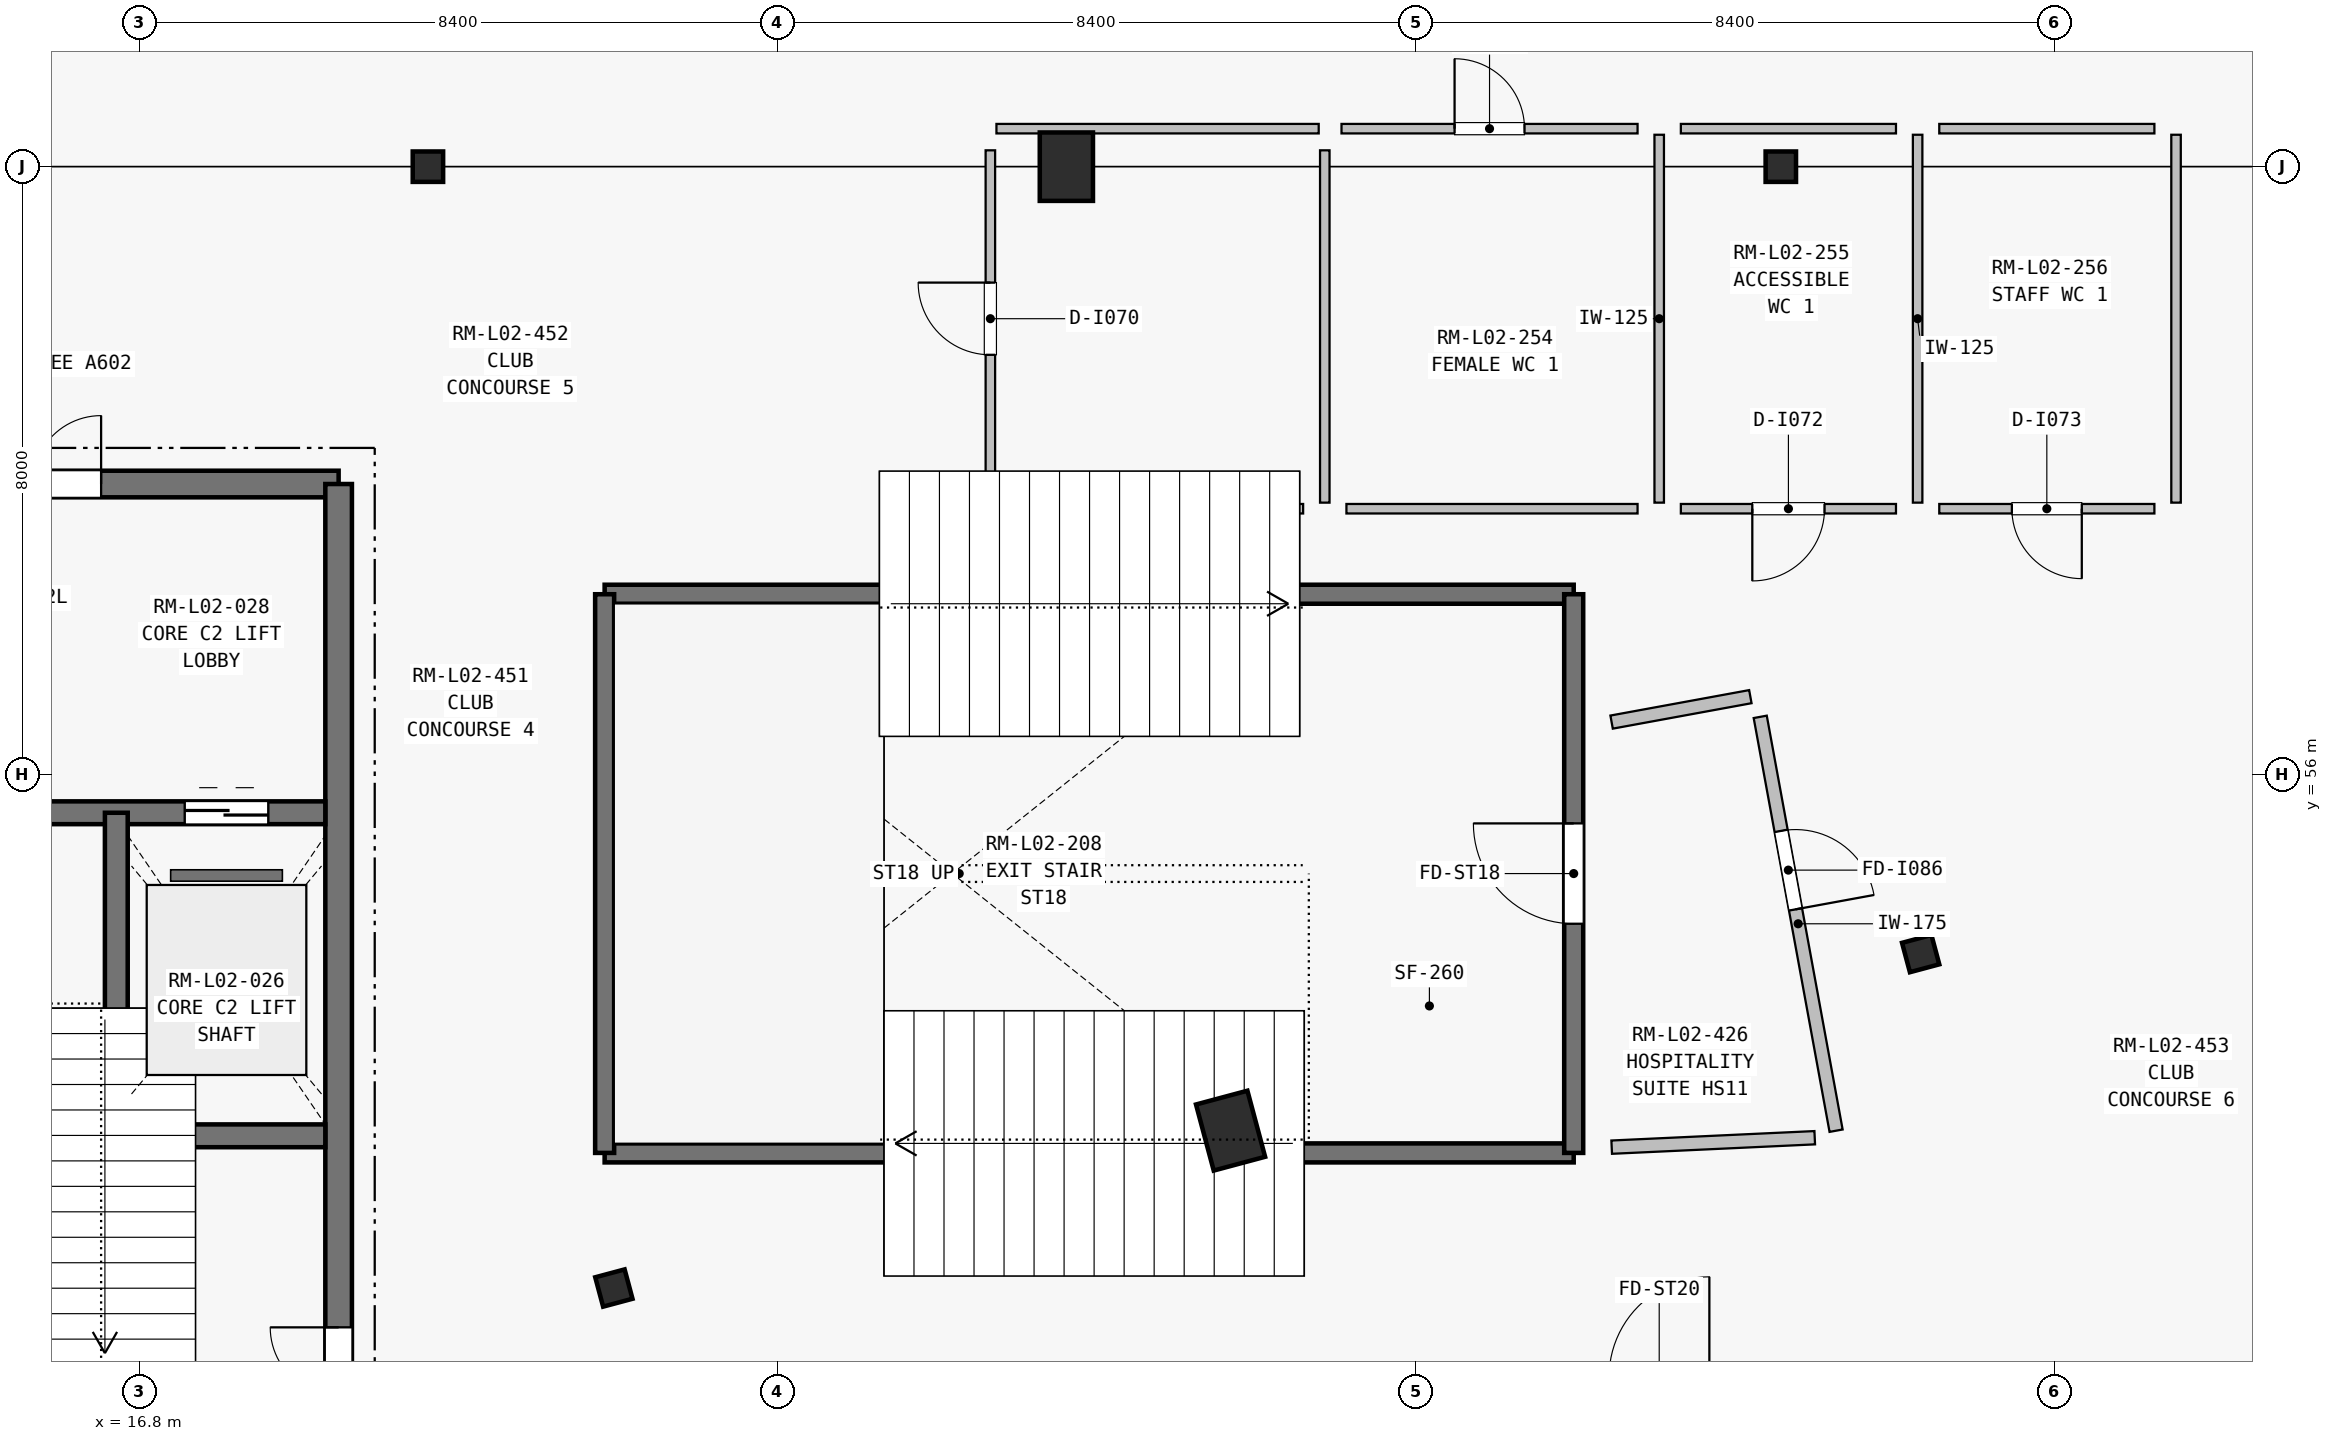
"""IFC4 building model, lengths in metres.
Left out: names, types, materials, properties, quantities, classifications, styles, units other than length and angle.
Written with IfcOpenShell. Run it as: python <this file> out.ifc"""

import sys

from ifc_helpers import new_model, si_unit, direction, frame, frame_2d, origin, origin_2d, place, context, subcontext, project, spatial, rectangle, i_section, extrude, element, fill, save


model = new_model("IFC4")
c1 = context("Model", 3, precision=1e-05, world=origin(), true_north=direction((0.0, 1.0)))
c2 = subcontext(c1, "Body", "Model", "MODEL_VIEW")
j1 = project(units=[si_unit("LENGTHUNIT", "METRE"), si_unit("PLANEANGLEUNIT", "RADIAN")], contexts=[c1])
p1 = place(None, origin())
s1 = spatial("IfcSite", under=j1, at=p1, CompositionType="ELEMENT")
p2 = place(p1, origin())
s2 = spatial("IfcBuilding", under=s1, at=p2, CompositionType="ELEMENT")
p3 = place(p2, frame((0.0, 0.0, 9.9)))
s3 = spatial("IfcBuildingStorey", under=s2, at=p3, CompositionType="ELEMENT", Elevation=9.9)
for number, where, z_axis, x_axis in (
    (1, (38.4, 64.0, 0.0), (0.0, 0.0, 1.0), (-1.0, 0.0, 0.0)),
    (2, (40.24, 53.647, 0.0), (0.0, 0.0, 1.0), (-0.966, -0.259, 0.0)),
):
    element("IfcColumn", number, at=place(p3, frame(where, z_axis=z_axis, x_axis=x_axis)), inside=s3, PredefinedType="COLUMN", context=c2, shape_type="SweptSolid", body=[
        extrude(i_section(OverallWidth=0.4, OverallDepth=0.4, WebThickness=0.018, FlangeThickness=0.032, at=origin_2d()), origin(), (0.0, 0.0, 1.0), 4.5),
    ])
for number, where, z_axis, x_axis in (
    (3, (29.0, 64.0, 0.0), (0.0, 0.0, 1.0), (-1.0, 0.0, 0.0)),
    (4, (31.16, 51.318, 0.0), (0.0, 0.0, 1.0), (-0.966, -0.259, 0.0)),
):
    element("IfcColumn", number, at=place(p3, frame(where, z_axis=z_axis, x_axis=x_axis)), inside=s3, PredefinedType="COLUMN", context=c2, shape_type="SweptSolid", body=[
        extrude(rectangle(XDim=0.7, YDim=0.9, at=origin_2d()), origin(), (0.0, 0.0, 1.0), 4.5),
    ])
for number, where, z_axis, x_axis in (
    (5, (20.6, 64.0, 0.0), (0.0, 0.0, 1.0), (-1.0, 0.0, 0.0)),
    (6, (23.046, 49.247, 0.0), (0.0, 0.0, 1.0), (-0.966, -0.259, 0.0)),
):
    element("IfcColumn", number, at=place(p3, frame(where, z_axis=z_axis, x_axis=x_axis)), inside=s3, PredefinedType="COLUMN", context=c2, shape_type="SweptSolid", body=[
        extrude(i_section(OverallWidth=0.4, OverallDepth=0.4, WebThickness=0.016, FlangeThickness=0.028, at=origin_2d()), origin(), (0.0, 0.0, 1.0), 4.5),
    ])
p4 = place(p3, frame((11.375, 59.825, 0.0), z_axis=(0.0, 0.0, 1.0), x_axis=(1.0, 0.0, 0.0)))
e7 = element("IfcWall", 7, at=p4, inside=s3, PredefinedType="SHEAR", context=c2, shape_type="SweptSolid", body=[
    extrude(rectangle(XDim=8.05, YDim=0.35, at=frame_2d((4.025, 0.0))), origin(), (0.0, 0.0, 1.0), 4.5),
])
p5 = place(p4, frame((3.125, 0.0, 0.0)))
e8 = element("IfcOpeningElement", 8, at=p5, cuts=e7, PredefinedType="OPENING", context=c2, shape_type="SweptSolid", body=[
    extrude(rectangle(XDim=1.8, YDim=2.25, at=frame_2d((0.9, 1.125))), frame((0.0, 0.185, 0.0), z_axis=(0.0, -1.0, 0.0), x_axis=(1.0, 0.0, 0.0)), (0.0, 0.0, 1.0), 0.37),
])
p6 = place(p3, frame((19.425, 44.975, 0.0), z_axis=(0.0, 0.0, 1.0), x_axis=(0.0, 1.0, 0.0)))
e9 = element("IfcWall", 9, at=p6, inside=s3, PredefinedType="SHEAR", context=c2, shape_type="SweptSolid", body=[
    extrude(rectangle(XDim=14.85, YDim=0.35, at=frame_2d((7.425, 0.0))), origin(), (0.0, 0.0, 1.0), 4.5),
])
p7 = place(p6, frame((2.855, 0.0, 0.0)))
e10 = element("IfcOpeningElement", 10, at=p7, cuts=e9, PredefinedType="OPENING", context=c2, shape_type="SweptSolid", body=[
    extrude(rectangle(XDim=0.9, YDim=2.1, at=frame_2d((0.45, 1.05))), frame((0.0, 0.185, 0.0), z_axis=(0.0, -1.0, 0.0), x_axis=(1.0, 0.0, 0.0)), (0.0, 0.0, 1.0), 0.37),
])
p8 = place(p3, frame((11.55, 55.5, 0.0), z_axis=(0.0, 0.0, 1.0), x_axis=(1.0, 0.0, 0.0)))
e11 = element("IfcWall", 11, at=p8, inside=s3, PredefinedType="SHEAR", context=c2, shape_type="SweptSolid", body=[
    extrude(rectangle(XDim=7.7, YDim=0.3, at=frame_2d((3.85, 0.0))), origin(), (0.0, 0.0, 1.0), 4.5),
])
p9 = place(p8, frame((1.65, 0.0, 0.0)))
e12 = element("IfcOpeningElement", 12, at=p9, cuts=e11, PredefinedType="OPENING", context=c2, shape_type="SweptSolid", body=[
    extrude(rectangle(XDim=1.4, YDim=2.2, at=frame_2d((0.7, 1.1))), frame((0.0, 0.16, 0.0), z_axis=(0.0, -1.0, 0.0), x_axis=(1.0, 0.0, 0.0)), (0.0, 0.0, 1.0), 0.32),
])
p10 = place(p8, frame((5.85, 0.0, 0.0)))
e13 = element("IfcOpeningElement", 13, at=p10, cuts=e11, PredefinedType="OPENING", context=c2, shape_type="SweptSolid", body=[
    extrude(rectangle(XDim=1.1, YDim=2.2, at=frame_2d((0.55, 1.1))), frame((0.0, 0.16, 0.0), z_axis=(0.0, -1.0, 0.0), x_axis=(1.0, 0.0, 0.0)), (0.0, 0.0, 1.0), 0.32),
])
p11 = place(p3, frame((16.5, 45.15, 0.0), z_axis=(0.0, 0.0, 1.0), x_axis=(0.0, 1.0, 0.0)))
e14 = element("IfcWall", 14, at=p11, inside=s3, PredefinedType="SHEAR", context=c2, shape_type="SweptSolid", body=[
    extrude(rectangle(XDim=10.35, YDim=0.3, at=frame_2d((5.175, 0.0))), origin(), (0.0, 0.0, 1.0), 4.5),
])
p12 = place(p3, frame((16.65, 51.25, 0.0), z_axis=(0.0, 0.0, 1.0), x_axis=(1.0, 0.0, 0.0)))
e15 = element("IfcWall", 15, at=p12, inside=s3, PredefinedType="SHEAR", context=c2, shape_type="SweptSolid", body=[
    extrude(rectangle(XDim=2.6, YDim=0.3, at=frame_2d((1.3, 0.0))), origin(), (0.0, 0.0, 1.0), 4.5),
])
for number, where, z_axis, x_axis in (
    (16, (22.925, 51.025, 0.0), (0.0, 0.0, 1.0), (1.0, 0.0, 0.0)),
    (17, (22.925, 58.375, 0.0), (0.0, 0.0, 1.0), (1.0, 0.0, 0.0)),
):
    element("IfcWall", number, at=place(p3, frame(where, z_axis=z_axis, x_axis=x_axis)), inside=s3, PredefinedType="SHEAR", context=c2, shape_type="SweptSolid", body=[
        extrude(rectangle(XDim=12.75, YDim=0.25, at=frame_2d((6.375, 0.0))), origin(), (0.0, 0.0, 1.0), 4.5),
    ])
p13 = place(p3, frame((22.925, 51.025, 0.0), z_axis=(0.0, 0.0, 1.0), x_axis=(0.0, 1.0, 0.0)))
e18 = element("IfcWall", 18, at=p13, inside=s3, PredefinedType="SHEAR", context=c2, shape_type="SweptSolid", body=[
    extrude(rectangle(XDim=7.35, YDim=0.25, at=frame_2d((3.675, 0.0))), origin(), (0.0, 0.0, 1.0), 4.5),
])
p14 = place(p3, frame((35.675, 51.025, 0.0), z_axis=(0.0, 0.0, 1.0), x_axis=(0.0, 1.0, 0.0)))
e19 = element("IfcWall", 19, at=p14, inside=s3, PredefinedType="SHEAR", context=c2, shape_type="SweptSolid", body=[
    extrude(rectangle(XDim=7.35, YDim=0.25, at=frame_2d((3.675, 0.0))), origin(), (0.0, 0.0, 1.0), 4.5),
])
p15 = place(p14, frame((3.015, 0.0, 0.0)))
e20 = element("IfcOpeningElement", 20, at=p15, cuts=e19, PredefinedType="OPENING", context=c2, shape_type="SweptSolid", body=[
    extrude(rectangle(XDim=1.32, YDim=2.2, at=frame_2d((0.66, 1.1))), frame((0.0, 0.135, 0.0), z_axis=(0.0, -1.0, 0.0), x_axis=(1.0, 0.0, 0.0)), (0.0, 0.0, 1.0), 0.27),
])
p16 = place(p3, frame((28.08, 64.5, 0.0), z_axis=(0.0, 0.0, 1.0), x_axis=(1.0, 0.0, 0.0)))
e21 = element("IfcWall", 21, at=p16, inside=s3, PredefinedType="PARTITIONING", context=c2, shape_type="SweptSolid", body=[
    extrude(rectangle(XDim=4.24, YDim=0.125, at=frame_2d((2.12, 0.0))), origin(), (0.0, 0.0, 1.0), 4.19),
])
p17 = place(p3, frame((32.4, 64.215, 0.0), z_axis=(0.0, 0.0, 1.0), x_axis=(0.0, -1.0, 0.0)))
e22 = element("IfcWall", 22, at=p17, inside=s3, PredefinedType="PARTITIONING", context=c2, shape_type="SweptSolid", body=[
    extrude(rectangle(XDim=4.635, YDim=0.125, at=frame_2d((2.317, 0.0))), origin(), (0.0, 0.0, 1.0), 3.637),
])
p18 = place(p3, frame((32.115, 59.5, 0.0), z_axis=(0.0, 0.0, 1.0), x_axis=(-1.0, 0.0, 0.0)))
e23 = element("IfcWall", 23, at=p18, inside=s3, PredefinedType="PARTITIONING", context=c2, shape_type="SweptSolid", body=[
    extrude(rectangle(XDim=4.035, YDim=0.125, at=frame_2d((2.018, 0.0))), origin(), (0.0, 0.0, 1.0), 4.22),
])
p19 = place(p3, frame((28.0, 59.785, 0.0), z_axis=(0.0, 0.0, 1.0), x_axis=(0.0, 1.0, 0.0)))
e24 = element("IfcWall", 24, at=p19, inside=s3, PredefinedType="PARTITIONING", context=c2, shape_type="SweptSolid", body=[
    extrude(rectangle(XDim=4.43, YDim=0.125, at=frame_2d((2.215, 0.0))), origin(), (0.0, 0.0, 1.0), 3.637),
])
p20 = place(p19, frame((1.74, 0.0, 0.0)))
e25 = element("IfcOpeningElement", 25, at=p20, cuts=e24, PredefinedType="OPENING", context=c2, shape_type="SweptSolid", body=[
    extrude(rectangle(XDim=0.95, YDim=2.1, at=frame_2d((0.475, 1.05))), frame((0.0, 0.073, 0.0), z_axis=(0.0, -1.0, 0.0), x_axis=(1.0, 0.0, 0.0)), (0.0, 0.0, 1.0), 0.145),
])
p21 = place(p3, frame((36.8, 64.42, 0.0), z_axis=(0.0, 0.0, 1.0), x_axis=(0.0, -1.0, 0.0)))
e26 = element("IfcWall", 26, at=p21, inside=s3, PredefinedType="PARTITIONING", context=c2, shape_type="SweptSolid", body=[
    extrude(rectangle(XDim=4.84, YDim=0.125, at=frame_2d((2.42, 0.0))), origin(), (0.0, 0.0, 1.0), 3.637),
])
p22 = place(p3, frame((36.515, 59.5, 0.0), z_axis=(0.0, 0.0, 1.0), x_axis=(-1.0, 0.0, 0.0)))
e27 = element("IfcWall", 27, at=p22, inside=s3, PredefinedType="PARTITIONING", context=c2, shape_type="SweptSolid", body=[
    extrude(rectangle(XDim=3.83, YDim=0.125, at=frame_2d((1.915, 0.0))), origin(), (0.0, 0.0, 1.0), 4.22),
])
p23 = place(p3, frame((32.62, 64.5, 0.0), z_axis=(0.0, 0.0, 1.0), x_axis=(1.0, 0.0, 0.0)))
e28 = element("IfcWall", 28, at=p23, inside=s3, PredefinedType="PARTITIONING", context=c2, shape_type="SweptSolid", body=[
    extrude(rectangle(XDim=3.895, YDim=0.125, at=frame_2d((1.948, 0.0))), origin(), (0.0, 0.0, 1.0), 4.19),
])
p24 = place(p23, frame((1.488, 0.0, 0.0)))
e29 = element("IfcOpeningElement", 29, at=p24, cuts=e28, PredefinedType="OPENING", context=c2, shape_type="SweptSolid", body=[
    extrude(rectangle(XDim=0.92, YDim=2.1, at=frame_2d((0.46, 1.05))), frame((0.0, 0.073, 0.0), z_axis=(0.0, -1.0, 0.0), x_axis=(1.0, 0.0, 0.0)), (0.0, 0.0, 1.0), 0.145),
])
p25 = place(p3, frame((40.2, 64.42, 0.0), z_axis=(0.0, 0.0, 1.0), x_axis=(0.0, -1.0, 0.0)))
e30 = element("IfcWall", 30, at=p25, inside=s3, PredefinedType="PARTITIONING", context=c2, shape_type="SweptSolid", body=[
    extrude(rectangle(XDim=4.84, YDim=0.125, at=frame_2d((2.42, 0.0))), origin(), (0.0, 0.0, 1.0), 4.22),
])
p26 = place(p3, frame((39.915, 59.5, 0.0), z_axis=(0.0, 0.0, 1.0), x_axis=(-1.0, 0.0, 0.0)))
e31 = element("IfcWall", 31, at=p26, inside=s3, PredefinedType="PARTITIONING", context=c2, shape_type="SweptSolid", body=[
    extrude(rectangle(XDim=2.831, YDim=0.125, at=frame_2d((1.415, 0.0))), origin(), (0.0, 0.0, 1.0), 3.255),
])
p27 = place(p26, frame((0.94, 0.0, 0.0)))
e32 = element("IfcOpeningElement", 32, at=p27, cuts=e31, PredefinedType="OPENING", context=c2, shape_type="SweptSolid", body=[
    extrude(rectangle(XDim=0.95, YDim=2.1, at=frame_2d((0.475, 1.05))), frame((0.0, 0.073, 0.0), z_axis=(0.0, -1.0, 0.0), x_axis=(1.0, 0.0, 0.0)), (0.0, 0.0, 1.0), 0.145),
])
p28 = place(p3, frame((37.085, 64.5, 0.0), z_axis=(0.0, 0.0, 1.0), x_axis=(1.0, 0.0, 0.0)))
e33 = element("IfcWall", 33, at=p28, inside=s3, PredefinedType="PARTITIONING", context=c2, shape_type="SweptSolid", body=[
    extrude(rectangle(XDim=2.831, YDim=0.125, at=frame_2d((1.415, 0.0))), origin(), (0.0, 0.0, 1.0), 3.255),
])
p29 = place(p3, frame((43.6, 64.42, 0.0), z_axis=(0.0, 0.0, 1.0), x_axis=(0.0, -1.0, 0.0)))
e34 = element("IfcWall", 34, at=p29, inside=s3, PredefinedType="PARTITIONING", context=c2, shape_type="SweptSolid", body=[
    extrude(rectangle(XDim=4.84, YDim=0.125, at=frame_2d((2.42, 0.0))), origin(), (0.0, 0.0, 1.0), 4.22),
])
p30 = place(p3, frame((43.315, 59.5, 0.0), z_axis=(0.0, 0.0, 1.0), x_axis=(-1.0, 0.0, 0.0)))
e35 = element("IfcWall", 35, at=p30, inside=s3, PredefinedType="PARTITIONING", context=c2, shape_type="SweptSolid", body=[
    extrude(rectangle(XDim=2.83, YDim=0.125, at=frame_2d((1.415, 0.0))), origin(), (0.0, 0.0, 1.0), 4.22),
])
p31 = place(p30, frame((0.955, 0.0, 0.0)))
e36 = element("IfcOpeningElement", 36, at=p31, cuts=e35, PredefinedType="OPENING", context=c2, shape_type="SweptSolid", body=[
    extrude(rectangle(XDim=0.92, YDim=2.1, at=frame_2d((0.46, 1.05))), frame((0.0, 0.073, 0.0), z_axis=(0.0, -1.0, 0.0), x_axis=(1.0, 0.0, 0.0)), (0.0, 0.0, 1.0), 0.145),
])
p32 = place(p3, frame((40.485, 64.5, 0.0), z_axis=(0.0, 0.0, 1.0), x_axis=(1.0, 0.0, 0.0)))
e37 = element("IfcWall", 37, at=p32, inside=s3, PredefinedType="PARTITIONING", context=c2, shape_type="SweptSolid", body=[
    extrude(rectangle(XDim=2.83, YDim=0.125, at=frame_2d((1.415, 0.0))), origin(), (0.0, 0.0, 1.0), 4.19),
])
p33 = place(p3, frame((36.174, 56.693, 0.0), z_axis=(0.0, 0.0, 1.0), x_axis=(0.983605779692, 0.180332110719, 0.0)))
e38 = element("IfcWall", 38, at=p33, inside=s3, PredefinedType="PARTITIONING", context=c2, shape_type="SweptSolid", body=[
    extrude(rectangle(XDim=1.856, YDim=0.175, at=frame_2d((0.928, 0.0))), origin(), (0.0, 0.0, 1.0), 4.22),
])
p34 = place(p3, frame((38.129, 56.762, 0.0), z_axis=(0.0, 0.0, 1.0), x_axis=(0.180305821673, -0.983610599104, 0.0)))
e39 = element("IfcWall", 39, at=p34, inside=s3, PredefinedType="PARTITIONING", context=c2, shape_type="SweptSolid", body=[
    extrude(rectangle(XDim=5.535, YDim=0.175, at=frame_2d((2.768, 0.0))), origin(), (0.0, 0.0, 1.0), 4.22),
])
p35 = place(p34, frame((1.525, 0.0, 0.0)))
e40 = element("IfcOpeningElement", 40, at=p35, cuts=e39, PredefinedType="OPENING", context=c2, shape_type="SweptSolid", body=[
    extrude(rectangle(XDim=1.05, YDim=2.25, at=frame_2d((0.525, 1.125))), frame((0.0, 0.097, 0.0), z_axis=(0.0, -1.0, 0.0), x_axis=(1.0, 0.0, 0.0)), (0.0, 0.0, 1.0), 0.195),
])
p36 = place(p3, frame((38.846, 51.225, 0.0), z_axis=(0.0, 0.0, 1.0), x_axis=(-0.998919790454, -0.046467754829, 0.0)))
e41 = element("IfcWall", 41, at=p36, inside=s3, PredefinedType="PARTITIONING", context=c2, shape_type="SweptSolid", body=[
    extrude(rectangle(XDim=2.674, YDim=0.175, at=frame_2d((1.337, 0.0))), origin(), (0.0, 0.0, 1.0), 4.22),
])
p37 = place(p5, origin())
e42 = element("IfcDoor", 42, at=p37, inside=s3, OperationType="DOUBLE_DOOR_SINGLE_SWING", PredefinedType="DOOR", context=c2, shape_type="SweptSolid", body=[
    extrude(rectangle(XDim=1.8, YDim=2.25, at=frame_2d((0.9, 1.125))), frame((0.0, 0.025, 0.0), z_axis=(0.0, -1.0, 0.0), x_axis=(1.0, 0.0, 0.0)), (0.0, 0.0, 1.0), 0.05),
])
fill(e8, e42)
p38 = place(p7, origin())
e43 = element("IfcDoor", 43, at=p38, inside=s3, OperationType="SINGLE_SWING_RIGHT", PredefinedType="DOOR", context=c2, shape_type="SweptSolid", body=[
    extrude(rectangle(XDim=0.9, YDim=2.1, at=frame_2d((0.45, 1.05))), frame((0.0, 0.025, 0.0), z_axis=(0.0, -1.0, 0.0), x_axis=(1.0, 0.0, 0.0)), (0.0, 0.0, 1.0), 0.05),
])
fill(e10, e43)
p39 = place(p10, origin())
e44 = element("IfcDoor", 44, at=p39, inside=s3, OperationType="SLIDING_TO_LEFT", PredefinedType="DOOR", context=c2, shape_type="SweptSolid", body=[
    extrude(rectangle(XDim=1.1, YDim=2.2, at=frame_2d((0.55, 1.1))), frame((0.0, 0.025, 0.0), z_axis=(0.0, -1.0, 0.0), x_axis=(1.0, 0.0, 0.0)), (0.0, 0.0, 1.0), 0.05),
])
fill(e13, e44)
p40 = place(p15, origin())
e45 = element("IfcDoor", 45, at=p40, inside=s3, OperationType="SINGLE_SWING_RIGHT", PredefinedType="DOOR", context=c2, shape_type="SweptSolid", body=[
    extrude(rectangle(XDim=1.32, YDim=2.2, at=frame_2d((0.66, 1.1))), frame((0.0, 0.025, 0.0), z_axis=(0.0, -1.0, 0.0), x_axis=(1.0, 0.0, 0.0)), (0.0, 0.0, 1.0), 0.05),
])
fill(e20, e45)
p41 = place(p20, origin())
e46 = element("IfcDoor", 46, at=p41, inside=s3, OperationType="SINGLE_SWING_RIGHT", PredefinedType="DOOR", context=c2, shape_type="SweptSolid", body=[
    extrude(rectangle(XDim=0.95, YDim=2.1, at=frame_2d((0.475, 1.05))), frame((0.0, 0.025, 0.0), z_axis=(0.0, -1.0, 0.0), x_axis=(1.0, 0.0, 0.0)), (0.0, 0.0, 1.0), 0.05),
])
fill(e25, e46)
p42 = place(p24, origin())
e47 = element("IfcDoor", 47, at=p42, inside=s3, OperationType="SINGLE_SWING_LEFT", PredefinedType="DOOR", context=c2, shape_type="SweptSolid", body=[
    extrude(rectangle(XDim=0.92, YDim=2.1, at=frame_2d((0.46, 1.05))), frame((0.0, 0.025, 0.0), z_axis=(0.0, -1.0, 0.0), x_axis=(1.0, 0.0, 0.0)), (0.0, 0.0, 1.0), 0.05),
])
fill(e29, e47)
p43 = place(p27, origin())
e48 = element("IfcDoor", 48, at=p43, inside=s3, OperationType="SINGLE_SWING_RIGHT", PredefinedType="DOOR", context=c2, shape_type="SweptSolid", body=[
    extrude(rectangle(XDim=0.95, YDim=2.1, at=frame_2d((0.475, 1.05))), frame((0.0, 0.025, 0.0), z_axis=(0.0, -1.0, 0.0), x_axis=(1.0, 0.0, 0.0)), (0.0, 0.0, 1.0), 0.05),
])
fill(e32, e48)
p44 = place(p31, origin())
e49 = element("IfcDoor", 49, at=p44, inside=s3, OperationType="SINGLE_SWING_LEFT", PredefinedType="DOOR", context=c2, shape_type="SweptSolid", body=[
    extrude(rectangle(XDim=0.92, YDim=2.1, at=frame_2d((0.46, 1.05))), frame((0.0, 0.025, 0.0), z_axis=(0.0, -1.0, 0.0), x_axis=(1.0, 0.0, 0.0)), (0.0, 0.0, 1.0), 0.05),
])
fill(e36, e49)
p45 = place(p35, origin())
e50 = element("IfcDoor", 50, at=p45, inside=s3, OperationType="SINGLE_SWING_RIGHT", PredefinedType="DOOR", context=c2, shape_type="SweptSolid", body=[
    extrude(rectangle(XDim=1.05, YDim=2.25, at=frame_2d((0.525, 1.125))), frame((0.0, 0.025, 0.0), z_axis=(0.0, -1.0, 0.0), x_axis=(1.0, 0.0, 0.0)), (0.0, 0.0, 1.0), 0.05),
])
fill(e40, e50)
save(model, sys.argv[1])
